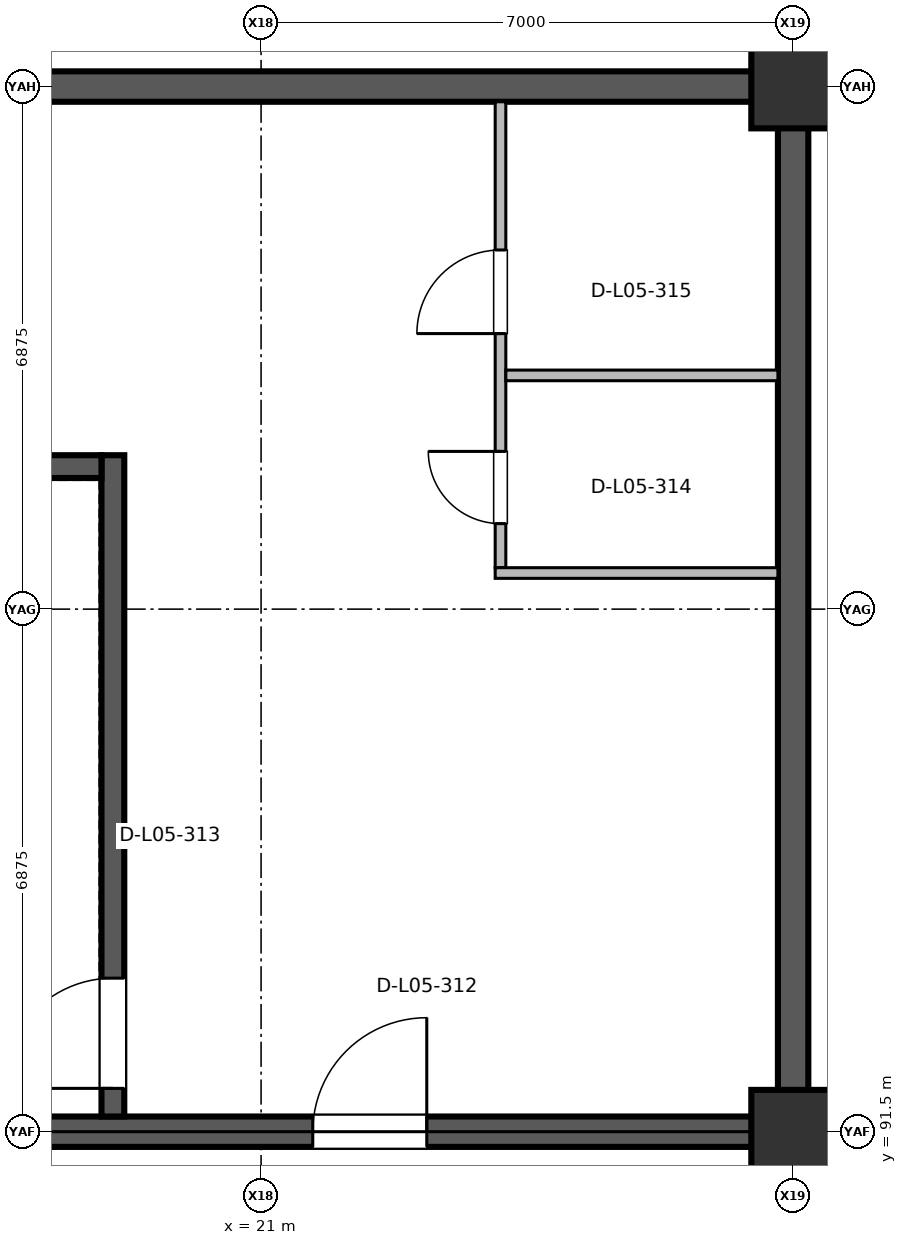
"""IFC4 building model, lengths in metres.
Left out: names, types, materials, properties, quantities, classifications, styles, units other than length and angle.
Written with IfcOpenShell. Run it as: python <this file> out.ifc"""

import sys

from ifc_helpers import new_model, si_unit, direction, frame, frame_2d, origin, origin_2d, place, context, subcontext, project, spatial, rectangle, circle, extrude, element, fill, save


model = new_model("IFC4")
c1 = context("Model", 3, precision=1e-05, world=origin(), true_north=direction((0.0, 1.0)))
c2 = subcontext(c1, "Body", "Model", "MODEL_VIEW")
j1 = project(units=[si_unit("LENGTHUNIT", "METRE"), si_unit("PLANEANGLEUNIT", "RADIAN")], contexts=[c1])
p1 = place(None, origin())
s1 = spatial("IfcSite", under=j1, at=p1, CompositionType="ELEMENT")
p2 = place(p1, origin())
s2 = spatial("IfcBuilding", under=s1, at=p2, CompositionType="ELEMENT")
p3 = place(p2, frame((0.0, 0.0, 21.0)))
s3 = spatial("IfcBuildingStorey", under=s2, at=p3, CompositionType="ELEMENT", Elevation=21.0)
for number, where, z_axis, x_axis in (
    (1, (28.0, 91.5, 0.0), (0.0, 0.0, 1.0), (1.0, 0.0, 0.0)),
    (2, (28.0, 105.25, 0.0), (0.0, 0.0, 1.0), (1.0, 0.0, 0.0)),
):
    element("IfcColumn", number, at=place(p3, frame(where, z_axis=z_axis, x_axis=x_axis)), inside=s3, PredefinedType="COLUMN", context=c2, shape_type="SweptSolid", body=[
        extrude(circle(Radius=0.55, at=origin_2d()), origin(), (0.0, 0.0, 1.0), 5.185),
    ])
p4 = place(p3, frame((28.0, 91.7, 0.0), z_axis=(0.0, 0.0, 1.0), x_axis=(0.0, 1.0, 0.0)))
e3 = element("IfcWall", 3, at=p4, inside=s3, PredefinedType="SHEAR", context=c2, shape_type="SweptSolid", body=[
    extrude(rectangle(XDim=13.35, YDim=0.4, at=frame_2d((6.675, 0.0))), origin(), (0.0, 0.0, 1.0), 5.185),
])
p5 = place(p3, frame((14.2, 91.5, 0.0), z_axis=(0.0, 0.0, 1.0), x_axis=(1.0, 0.0, 0.0)))
e4 = element("IfcWall", 4, at=p5, inside=s3, PredefinedType="SHEAR", context=c2, shape_type="SweptSolid", body=[
    extrude(rectangle(XDim=13.6, YDim=0.4, at=frame_2d((6.8, 0.0))), origin(), (0.0, 0.0, 1.0), 5.185),
])
p6 = place(p5, frame((7.48, 0.0, 0.0)))
e5 = element("IfcOpeningElement", 5, at=p6, cuts=e4, PredefinedType="OPENING", context=c2, shape_type="SweptSolid", body=[
    extrude(rectangle(XDim=1.5, YDim=2.2, at=frame_2d((0.75, 1.1))), frame((0.0, 0.21, 0.0), z_axis=(0.0, -1.0, 0.0), x_axis=(1.0, 0.0, 0.0)), (0.0, 0.0, 1.0), 0.42),
])
p7 = place(p3, frame((14.2, 105.25, 0.0), z_axis=(0.0, 0.0, 1.0), x_axis=(1.0, 0.0, 0.0)))
e6 = element("IfcWall", 6, at=p7, inside=s3, PredefinedType="SHEAR", context=c2, shape_type="SweptSolid", body=[
    extrude(rectangle(XDim=13.6, YDim=0.4, at=frame_2d((6.8, 0.0))), origin(), (0.0, 0.0, 1.0), 5.185),
])
p8 = place(p3, frame((19.05, 91.7, 0.0), z_axis=(0.0, 0.0, 1.0), x_axis=(0.0, 1.0, 0.0)))
e7 = element("IfcWall", 7, at=p8, inside=s3, PredefinedType="SHEAR", context=c2, shape_type="SweptSolid", body=[
    extrude(rectangle(XDim=8.7, YDim=0.3, at=frame_2d((4.35, 0.0))), origin(), (0.0, 0.0, 1.0), 5.185),
])
p9 = place(p8, frame((0.37, 0.0, 0.0)))
e8 = element("IfcOpeningElement", 8, at=p9, cuts=e7, PredefinedType="OPENING", context=c2, shape_type="SweptSolid", body=[
    extrude(rectangle(XDim=1.45, YDim=2.2, at=frame_2d((0.725, 1.1))), frame((0.0, 0.16, 0.0), z_axis=(0.0, -1.0, 0.0), x_axis=(1.0, 0.0, 0.0)), (0.0, 0.0, 1.0), 0.32),
])
p10 = place(p3, frame((24.15, 98.92, 0.0), z_axis=(0.0, 0.0, 1.0), x_axis=(0.0, 1.0, 0.0)))
e9 = element("IfcWall", 9, at=p10, inside=s3, PredefinedType="PARTITIONING", context=c2, shape_type="SweptSolid", body=[
    extrude(rectangle(XDim=6.13, YDim=0.14, at=frame_2d((3.065, 0.0))), origin(), (0.0, 0.0, 1.0), 4.42),
])
p11 = place(p10, frame((0.58, 0.0, 0.0)))
e10 = element("IfcOpeningElement", 10, at=p11, cuts=e9, PredefinedType="OPENING", context=c2, shape_type="SweptSolid", body=[
    extrude(rectangle(XDim=0.95, YDim=2.15, at=frame_2d((0.475, 1.075))), frame((0.0, 0.08, 0.0), z_axis=(0.0, -1.0, 0.0), x_axis=(1.0, 0.0, 0.0)), (0.0, 0.0, 1.0), 0.16),
])
p12 = place(p10, frame((3.08, 0.0, 0.0)))
e11 = element("IfcOpeningElement", 11, at=p12, cuts=e9, PredefinedType="OPENING", context=c2, shape_type="SweptSolid", body=[
    extrude(rectangle(XDim=1.1, YDim=2.15, at=frame_2d((0.55, 1.075))), frame((0.0, 0.08, 0.0), z_axis=(0.0, -1.0, 0.0), x_axis=(1.0, 0.0, 0.0)), (0.0, 0.0, 1.0), 0.16),
])
p13 = place(p3, frame((24.08, 98.85, 0.0), z_axis=(0.0, 0.0, 1.0), x_axis=(1.0, 0.0, 0.0)))
e12 = element("IfcWall", 12, at=p13, inside=s3, PredefinedType="PARTITIONING", context=c2, shape_type="SweptSolid", body=[
    extrude(rectangle(XDim=3.72, YDim=0.14, at=frame_2d((1.86, 0.0))), origin(), (0.0, 0.0, 1.0), 4.42),
])
p14 = place(p3, frame((24.22, 101.45, 0.0), z_axis=(0.0, 0.0, 1.0), x_axis=(1.0, 0.0, 0.0)))
e13 = element("IfcWall", 13, at=p14, inside=s3, PredefinedType="PARTITIONING", context=c2, shape_type="SweptSolid", body=[
    extrude(rectangle(XDim=3.58, YDim=0.14, at=frame_2d((1.79, 0.0))), origin(), (0.0, 0.0, 1.0), 4.42),
])
p15 = place(p3, frame((14.2, 100.25, 0.0), z_axis=(0.0, 0.0, 1.0), x_axis=(1.0, 0.0, 0.0)))
e14 = element("IfcWall", 14, at=p15, inside=s3, PredefinedType="SHEAR", context=c2, shape_type="SweptSolid", body=[
    extrude(rectangle(XDim=4.7, YDim=0.3, at=frame_2d((2.35, 0.0))), origin(), (0.0, 0.0, 1.0), 5.185),
])
p16 = place(p6, origin())
e15 = element("IfcDoor", 15, at=p16, inside=s3, OperationType="SINGLE_SWING_RIGHT", PredefinedType="DOOR", context=c2, shape_type="SweptSolid", body=[
    extrude(rectangle(XDim=1.5, YDim=2.2, at=frame_2d((0.75, 1.1))), frame((0.0, 0.025, 0.0), z_axis=(0.0, -1.0, 0.0), x_axis=(1.0, 0.0, 0.0)), (0.0, 0.0, 1.0), 0.05),
])
fill(e5, e15)
p17 = place(p9, origin())
e16 = element("IfcDoor", 16, at=p17, inside=s3, OperationType="SINGLE_SWING_LEFT", PredefinedType="DOOR", context=c2, shape_type="SweptSolid", body=[
    extrude(rectangle(XDim=1.45, YDim=2.2, at=frame_2d((0.725, 1.1))), frame((0.0, 0.025, 0.0), z_axis=(0.0, -1.0, 0.0), x_axis=(1.0, 0.0, 0.0)), (0.0, 0.0, 1.0), 0.05),
])
fill(e8, e16)
p18 = place(p11, origin())
e17 = element("IfcDoor", 17, at=p18, inside=s3, OperationType="SINGLE_SWING_RIGHT", PredefinedType="DOOR", context=c2, shape_type="SweptSolid", body=[
    extrude(rectangle(XDim=0.95, YDim=2.15, at=frame_2d((0.475, 1.075))), frame((0.0, 0.025, 0.0), z_axis=(0.0, -1.0, 0.0), x_axis=(1.0, 0.0, 0.0)), (0.0, 0.0, 1.0), 0.05),
])
fill(e10, e17)
p19 = place(p12, origin())
e18 = element("IfcDoor", 18, at=p19, inside=s3, OperationType="SINGLE_SWING_LEFT", PredefinedType="DOOR", context=c2, shape_type="SweptSolid", body=[
    extrude(rectangle(XDim=1.1, YDim=2.15, at=frame_2d((0.55, 1.075))), frame((0.0, 0.025, 0.0), z_axis=(0.0, -1.0, 0.0), x_axis=(1.0, 0.0, 0.0)), (0.0, 0.0, 1.0), 0.05),
])
fill(e11, e18)
save(model, sys.argv[1])
